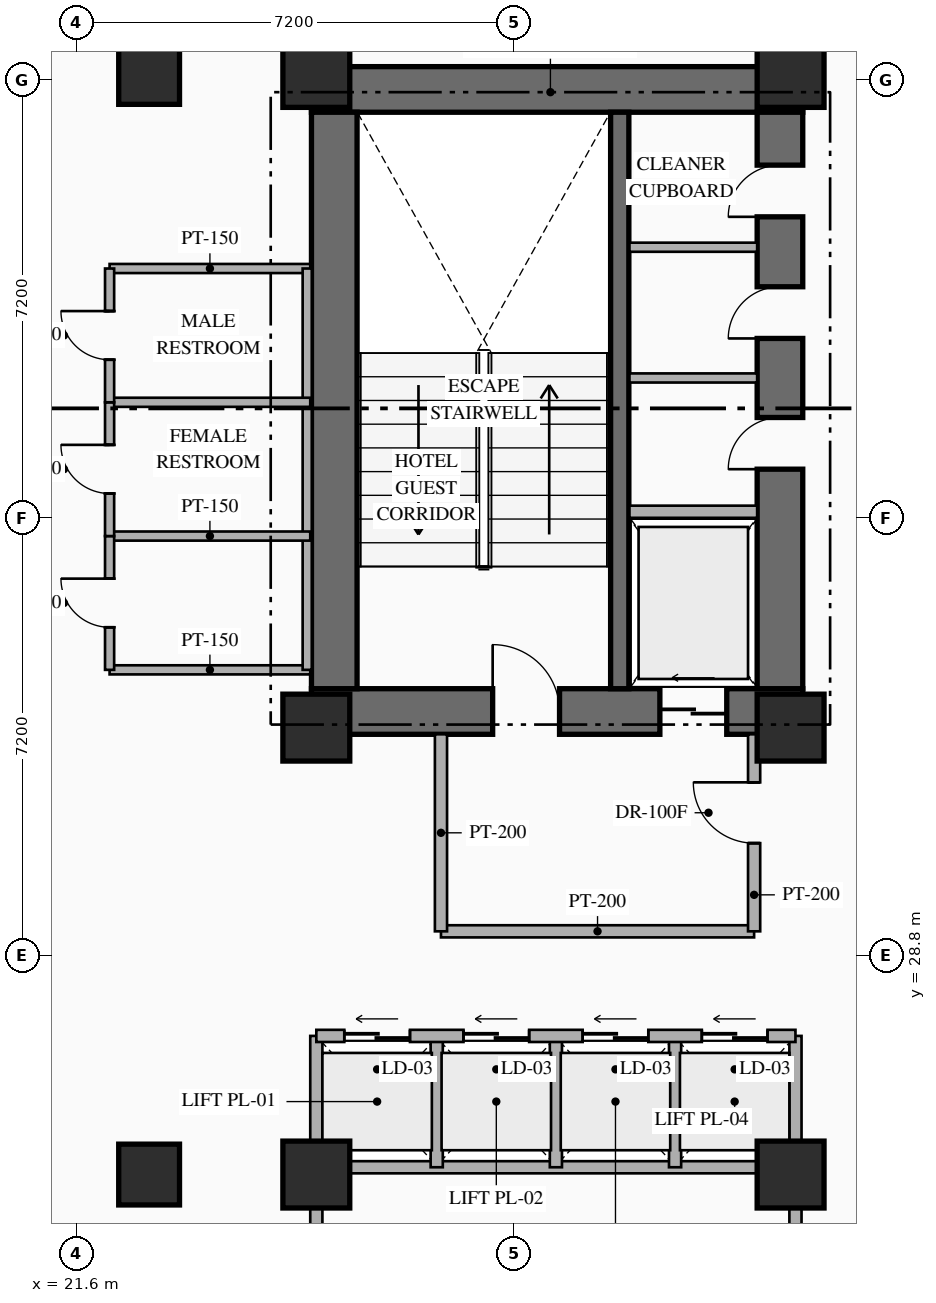
"""IFC4 building model, lengths in metres.
Left out: names, types, materials, properties, quantities, classifications, styles, units other than length and angle.
Written with IfcOpenShell. Run it as: python <this file> out.ifc"""

import sys

from ifc_helpers import new_model, si_unit, direction, frame, frame_2d, origin, origin_2d, place, context, subcontext, project, spatial, rectangle, hollow_rectangle, extrude, element, fill, save


model = new_model("IFC4")
c1 = context("Model", 3, precision=1e-05, world=origin(), true_north=direction((0.0, 1.0)))
c2 = subcontext(c1, "Body", "Model", "MODEL_VIEW")
j1 = project(units=[si_unit("LENGTHUNIT", "METRE"), si_unit("PLANEANGLEUNIT", "RADIAN")], contexts=[c1])
p1 = place(None, origin())
s1 = spatial("IfcSite", under=j1, at=p1, CompositionType="ELEMENT")
p2 = place(p1, origin())
s2 = spatial("IfcBuilding", under=s1, at=p2, CompositionType="ELEMENT")
p3 = place(p2, frame((0.0, 0.0, 60.05)))
s3 = spatial("IfcBuildingStorey", under=s2, at=p3, CompositionType="ELEMENT", Elevation=60.05)
p4 = place(p3, frame((25.47, 32.815, 0.0), z_axis=(0.0, 0.0, 1.0), x_axis=(1.0, 0.0, 0.0)))
e1 = element("IfcWall", 1, at=p4, inside=s3, PredefinedType="SHEAR", context=c2, shape_type="SweptSolid", body=[
    extrude(rectangle(XDim=8.08, YDim=0.75, at=frame_2d((4.04, 0.0))), origin(), (0.0, 0.0, 1.0), 3.35),
])
p5 = place(p4, frame((2.98, 0.0, 0.0)))
e2 = element("IfcOpeningElement", 2, at=p5, cuts=e1, PredefinedType="OPENING", context=c2, shape_type="SweptSolid", body=[
    extrude(rectangle(XDim=1.1, YDim=2.2, at=frame_2d((0.55, 1.1))), frame((0.0, 0.385, 0.0), z_axis=(0.0, -1.0, 0.0), x_axis=(1.0, 0.0, 0.0)), (0.0, 0.0, 1.0), 0.77),
])
p6 = place(p4, frame((5.73, 0.0, 0.0)))
e3 = element("IfcOpeningElement", 3, at=p6, cuts=e1, PredefinedType="OPENING", context=c2, shape_type="SweptSolid", body=[
    extrude(rectangle(XDim=1.1, YDim=2.15, at=frame_2d((0.55, 1.075))), frame((0.0, 0.385, 0.0), z_axis=(0.0, -1.0, 0.0), x_axis=(1.0, 0.0, 0.0)), (0.0, 0.0, 1.0), 0.77),
])
p7 = place(p3, frame((25.47, 43.045, 0.0), z_axis=(0.0, 0.0, 1.0), x_axis=(1.0, 0.0, 0.0)))
e4 = element("IfcWall", 4, at=p7, inside=s3, PredefinedType="SHEAR", context=c2, shape_type="SweptSolid", body=[
    extrude(rectangle(XDim=8.08, YDim=0.75, at=frame_2d((4.04, 0.0))), origin(), (0.0, 0.0, 1.0), 3.35),
])
p8 = place(p3, frame((25.845, 33.19, 0.0), z_axis=(0.0, 0.0, 1.0), x_axis=(0.0, 1.0, 0.0)))
e5 = element("IfcWall", 5, at=p8, inside=s3, PredefinedType="SHEAR", context=c2, shape_type="SweptSolid", body=[
    extrude(rectangle(XDim=9.48, YDim=0.75, at=frame_2d((4.74, 0.0))), origin(), (0.0, 0.0, 1.0), 3.35),
])
p9 = place(p3, frame((33.175, 33.19, 0.0), z_axis=(0.0, 0.0, 1.0), x_axis=(0.0, 1.0, 0.0)))
e6 = element("IfcWall", 6, at=p9, inside=s3, PredefinedType="SHEAR", context=c2, shape_type="SweptSolid", body=[
    extrude(rectangle(XDim=9.48, YDim=0.75, at=frame_2d((4.74, 0.0))), origin(), (0.0, 0.0, 1.0), 3.35),
])
p10 = place(p9, frame((3.61, 0.0, 0.0)))
e7 = element("IfcOpeningElement", 7, at=p10, cuts=e6, PredefinedType="OPENING", context=c2, shape_type="SweptSolid", body=[
    extrude(rectangle(XDim=0.85, YDim=2.08, at=frame_2d((0.425, 1.04))), frame((0.0, 0.385, 0.0), z_axis=(0.0, -1.0, 0.0), x_axis=(1.0, 0.0, 0.0)), (0.0, 0.0, 1.0), 0.77),
])
p11 = place(p9, frame((5.76, 0.0, 0.0)))
e8 = element("IfcOpeningElement", 8, at=p11, cuts=e6, PredefinedType="OPENING", context=c2, shape_type="SweptSolid", body=[
    extrude(rectangle(XDim=0.85, YDim=2.08, at=frame_2d((0.425, 1.04))), frame((0.0, 0.385, 0.0), z_axis=(0.0, -1.0, 0.0), x_axis=(1.0, 0.0, 0.0)), (0.0, 0.0, 1.0), 0.77),
])
p12 = place(p9, frame((7.76, 0.0, 0.0)))
e9 = element("IfcOpeningElement", 9, at=p12, cuts=e6, PredefinedType="OPENING", context=c2, shape_type="SweptSolid", body=[
    extrude(rectangle(XDim=0.85, YDim=2.08, at=frame_2d((0.425, 1.04))), frame((0.0, 0.385, 0.0), z_axis=(0.0, -1.0, 0.0), x_axis=(1.0, 0.0, 0.0)), (0.0, 0.0, 1.0), 0.77),
])
p13 = place(p3, frame((30.54, 33.19, 0.0), z_axis=(0.0, 0.0, 1.0), x_axis=(0.0, 1.0, 0.0)))
e10 = element("IfcWall", 10, at=p13, inside=s3, PredefinedType="SHEAR", context=c2, shape_type="SweptSolid", body=[
    extrude(rectangle(XDim=9.48, YDim=0.3, at=frame_2d((4.74, 0.0))), origin(), (0.0, 0.0, 1.0), 3.35),
])
for number, where, z_axis, x_axis in (
    (11, (25.55, 32.55, 0.0), (0.0, 0.0, 1.0), (1.0, 0.0, 0.0)),
    (12, (33.35, 32.55, 0.0), (0.0, 0.0, 1.0), (1.0, 0.0, 0.0)),
    (13, (25.55, 43.3, 0.0), (0.0, 0.0, 1.0), (1.0, 0.0, 0.0)),
    (14, (33.35, 43.3, 0.0), (0.0, 0.0, 1.0), (1.0, 0.0, 0.0)),
):
    element("IfcColumn", number, at=place(p3, frame(where, z_axis=z_axis, x_axis=x_axis)), inside=s3, PredefinedType="COLUMN", context=c2, shape_type="SweptSolid", body=[
        extrude(rectangle(XDim=1.1, YDim=1.1, at=origin_2d()), origin(), (0.0, 0.0, 1.0), 3.35),
    ])
for number, where, z_axis, x_axis in (
    (15, (25.55, 25.2, 0.0), (0.0, 0.0, 1.0), (1.0, 0.0, 0.0)),
    (16, (33.35, 25.2, 0.0), (0.0, 0.0, 1.0), (1.0, 0.0, 0.0)),
):
    element("IfcColumn", number, at=place(p3, frame(where, z_axis=z_axis, x_axis=x_axis)), inside=s3, PredefinedType="COLUMN", context=c2, shape_type="SweptSolid", body=[
        extrude(hollow_rectangle(XDim=1.1, YDim=1.1, WallThickness=0.04, at=origin_2d()), origin(), (0.0, 0.0, 1.0), 3.35),
    ])
for number, where, z_axis, x_axis in (
    (17, (22.8, 25.2, 0.0), (0.0, 0.0, 1.0), (1.0, 0.0, 0.0)),
    (18, (22.8, 43.3, 0.0), (0.0, 0.0, 1.0), (1.0, 0.0, 0.0)),
):
    element("IfcColumn", number, at=place(p3, frame(where, z_axis=z_axis, x_axis=x_axis)), inside=s3, PredefinedType="COLUMN", context=c2, shape_type="SweptSolid", body=[
        extrude(hollow_rectangle(XDim=1.0, YDim=1.0, WallThickness=0.038, at=origin_2d()), origin(), (0.0, 0.0, 1.0), 3.35),
    ])
p14 = place(p3, frame((30.7, 36.1, 0.0), z_axis=(0.0, 0.0, 1.0), x_axis=(1.0, 0.0, 0.0)))
e19 = element("IfcWall", 19, at=p14, inside=s3, PredefinedType="STANDARD", context=c2, shape_type="SweptSolid", body=[
    extrude(rectangle(XDim=2.1, YDim=0.2, at=frame_2d((1.05, 0.0))), origin(), (0.0, 0.0, 1.0), 3.13),
])
for number, where, z_axis, x_axis in (
    (20, (30.7, 38.3, 0.0), (0.0, 0.0, 1.0), (1.0, 0.0, 0.0)),
    (21, (30.7, 40.45, 0.0), (0.0, 0.0, 1.0), (1.0, 0.0, 0.0)),
):
    element("IfcWall", number, at=place(p3, frame(where, z_axis=z_axis, x_axis=x_axis)), inside=s3, PredefinedType="PARTITIONING", context=c2, shape_type="SweptSolid", body=[
        extrude(rectangle(XDim=2.1, YDim=0.15, at=frame_2d((1.05, 0.0))), origin(), (0.0, 0.0, 1.0), 3.13),
    ])
p15 = place(p3, frame((27.6, 29.2, 0.0), z_axis=(0.0, 0.0, 1.0), x_axis=(1.0, 0.0, 0.0)))
e22 = element("IfcWall", 22, at=p15, inside=s3, PredefinedType="STANDARD", context=c2, shape_type="SweptSolid", body=[
    extrude(rectangle(XDim=5.15, YDim=0.2, at=frame_2d((2.575, 0.0))), origin(), (0.0, 0.0, 1.0), 3.13),
])
p16 = place(p3, frame((27.6, 29.2, 0.0), z_axis=(0.0, 0.0, 1.0), x_axis=(0.0, 1.0, 0.0)))
e23 = element("IfcWall", 23, at=p16, inside=s3, PredefinedType="STANDARD", context=c2, shape_type="SweptSolid", body=[
    extrude(rectangle(XDim=3.24, YDim=0.2, at=frame_2d((1.62, 0.0))), origin(), (0.0, 0.0, 1.0), 3.13),
])
p17 = place(p3, frame((32.75, 29.2, 0.0), z_axis=(0.0, 0.0, 1.0), x_axis=(0.0, 1.0, 0.0)))
e24 = element("IfcWall", 24, at=p17, inside=s3, PredefinedType="STANDARD", context=c2, shape_type="SweptSolid", body=[
    extrude(rectangle(XDim=3.24, YDim=0.2, at=frame_2d((1.62, 0.0))), origin(), (0.0, 0.0, 1.0), 3.13),
])
p18 = place(p17, frame((1.45, 0.0, 0.0)))
e25 = element("IfcOpeningElement", 25, at=p18, cuts=e24, PredefinedType="OPENING", context=c2, shape_type="SweptSolid", body=[
    extrude(rectangle(XDim=1.0, YDim=2.2, at=frame_2d((0.5, 1.1))), frame((0.0, 0.11, 0.0), z_axis=(0.0, -1.0, 0.0), x_axis=(1.0, 0.0, 0.0)), (0.0, 0.0, 1.0), 0.22),
])
for number, where, z_axis, x_axis in (
    (26, (25.55, 23.4, 0.0), (0.0, 0.0, 1.0), (0.0, 1.0, 0.0)),
    (27, (33.43, 23.4, 0.0), (0.0, 0.0, 1.0), (0.0, 1.0, 0.0)),
):
    element("IfcWall", number, at=place(p3, frame(where, z_axis=z_axis, x_axis=x_axis)), inside=s3, PredefinedType="STANDARD", context=c2, shape_type="SweptSolid", body=[
        extrude(rectangle(XDim=4.08, YDim=0.2, at=frame_2d((2.04, 0.0))), origin(), (0.0, 0.0, 1.0), 2.425),
    ])
p19 = place(p3, frame((25.55, 25.32, 0.0), z_axis=(0.0, 0.0, 1.0), x_axis=(1.0, 0.0, 0.0)))
e28 = element("IfcWall", 28, at=p19, inside=s3, PredefinedType="STANDARD", context=c2, shape_type="SweptSolid", body=[
    extrude(rectangle(XDim=7.88, YDim=0.2, at=frame_2d((3.94, 0.0))), origin(), (0.0, 0.0, 1.0), 2.525),
])
for number, where, z_axis, x_axis in (
    (29, (27.53, 25.32, 0.0), (0.0, 0.0, 1.0), (0.0, 1.0, 0.0)),
    (30, (29.49, 25.32, 0.0), (0.0, 0.0, 1.0), (0.0, 1.0, 0.0)),
    (31, (31.45, 25.32, 0.0), (0.0, 0.0, 1.0), (0.0, 1.0, 0.0)),
):
    element("IfcWall", number, at=place(p3, frame(where, z_axis=z_axis, x_axis=x_axis)), inside=s3, PredefinedType="STANDARD", context=c2, shape_type="SweptSolid", body=[
        extrude(rectangle(XDim=2.16, YDim=0.2, at=frame_2d((1.08, 0.0))), origin(), (0.0, 0.0, 1.0), 3.13),
    ])
p20 = place(p3, frame((25.55, 27.48, 0.0), z_axis=(0.0, 0.0, 1.0), x_axis=(1.0, 0.0, 0.0)))
e32 = element("IfcWall", 32, at=p20, inside=s3, PredefinedType="STANDARD", context=c2, shape_type="SweptSolid", body=[
    extrude(rectangle(XDim=7.88, YDim=0.2, at=frame_2d((3.94, 0.0))), origin(), (0.0, 0.0, 1.0), 3.13),
])
p21 = place(p20, frame((0.46, 0.0, 0.0)))
e33 = element("IfcOpeningElement", 33, at=p21, cuts=e32, PredefinedType="OPENING", context=c2, shape_type="SweptSolid", body=[
    extrude(rectangle(XDim=1.08, YDim=2.15, at=frame_2d((0.54, 1.075))), frame((0.0, 0.11, 0.0), z_axis=(0.0, -1.0, 0.0), x_axis=(1.0, 0.0, 0.0)), (0.0, 0.0, 1.0), 0.22),
])
p22 = place(p20, frame((2.42, 0.0, 0.0)))
e34 = element("IfcOpeningElement", 34, at=p22, cuts=e32, PredefinedType="OPENING", context=c2, shape_type="SweptSolid", body=[
    extrude(rectangle(XDim=1.08, YDim=2.15, at=frame_2d((0.54, 1.075))), frame((0.0, 0.11, 0.0), z_axis=(0.0, -1.0, 0.0), x_axis=(1.0, 0.0, 0.0)), (0.0, 0.0, 1.0), 0.22),
])
p23 = place(p20, frame((4.38, 0.0, 0.0)))
e35 = element("IfcOpeningElement", 35, at=p23, cuts=e32, PredefinedType="OPENING", context=c2, shape_type="SweptSolid", body=[
    extrude(rectangle(XDim=1.08, YDim=2.15, at=frame_2d((0.54, 1.075))), frame((0.0, 0.11, 0.0), z_axis=(0.0, -1.0, 0.0), x_axis=(1.0, 0.0, 0.0)), (0.0, 0.0, 1.0), 0.22),
])
p24 = place(p20, frame((6.34, 0.0, 0.0)))
e36 = element("IfcOpeningElement", 36, at=p24, cuts=e32, PredefinedType="OPENING", context=c2, shape_type="SweptSolid", body=[
    extrude(rectangle(XDim=1.08, YDim=2.15, at=frame_2d((0.54, 1.075))), frame((0.0, 0.11, 0.0), z_axis=(0.0, -1.0, 0.0), x_axis=(1.0, 0.0, 0.0)), (0.0, 0.0, 1.0), 0.22),
])
for number, where, z_axis, x_axis in (
    (37, (22.15, 33.5, 0.0), (0.0, 0.0, 1.0), (1.0, 0.0, 0.0)),
    (38, (22.15, 40.1, 0.0), (0.0, 0.0, 1.0), (1.0, 0.0, 0.0)),
):
    element("IfcWall", number, at=place(p3, frame(where, z_axis=z_axis, x_axis=x_axis)), inside=s3, PredefinedType="PARTITIONING", context=c2, shape_type="SweptSolid", body=[
        extrude(rectangle(XDim=3.3, YDim=0.15, at=frame_2d((1.65, 0.0))), origin(), (0.0, 0.0, 1.0), 3.13),
    ])
p25 = place(p3, frame((25.4, 33.5, 0.0), z_axis=(0.0, 0.0, 1.0), x_axis=(0.0, 1.0, 0.0)))
e39 = element("IfcWall", 39, at=p25, inside=s3, PredefinedType="PARTITIONING", context=c2, shape_type="SweptSolid", body=[
    extrude(rectangle(XDim=6.6, YDim=0.15, at=frame_2d((3.3, 0.0))), origin(), (0.0, 0.0, 1.0), 3.13),
])
for number, where, z_axis, x_axis in (
    (40, (22.15, 35.7, 0.0), (0.0, 0.0, 1.0), (1.0, 0.0, 0.0)),
    (41, (22.15, 37.9, 0.0), (0.0, 0.0, 1.0), (1.0, 0.0, 0.0)),
):
    element("IfcWall", number, at=place(p3, frame(where, z_axis=z_axis, x_axis=x_axis)), inside=s3, PredefinedType="PARTITIONING", context=c2, shape_type="SweptSolid", body=[
        extrude(rectangle(XDim=3.3, YDim=0.15, at=frame_2d((1.65, 0.0))), origin(), (0.0, 0.0, 1.0), 3.13),
    ])
p26 = place(p3, frame((22.15, 33.5, 0.0), z_axis=(0.0, 0.0, 1.0), x_axis=(0.0, 1.0, 0.0)))
e42 = element("IfcWall", 42, at=p26, inside=s3, PredefinedType="PARTITIONING", context=c2, shape_type="SweptSolid", body=[
    extrude(rectangle(XDim=2.2, YDim=0.15, at=frame_2d((1.1, 0.0))), origin(), (0.0, 0.0, 1.0), 3.13),
])
p27 = place(p26, frame((0.7, 0.0, 0.0)))
e43 = element("IfcOpeningElement", 43, at=p27, cuts=e42, PredefinedType="OPENING", context=c2, shape_type="SweptSolid", body=[
    extrude(rectangle(XDim=0.8, YDim=2.06, at=frame_2d((0.4, 1.03))), frame((0.0, 0.085, 0.0), z_axis=(0.0, -1.0, 0.0), x_axis=(1.0, 0.0, 0.0)), (0.0, 0.0, 1.0), 0.17),
])
p28 = place(p3, frame((22.15, 35.7, 0.0), z_axis=(0.0, 0.0, 1.0), x_axis=(0.0, 1.0, 0.0)))
e44 = element("IfcWall", 44, at=p28, inside=s3, PredefinedType="PARTITIONING", context=c2, shape_type="SweptSolid", body=[
    extrude(rectangle(XDim=2.2, YDim=0.15, at=frame_2d((1.1, 0.0))), origin(), (0.0, 0.0, 1.0), 3.13),
])
p29 = place(p28, frame((0.7, 0.0, 0.0)))
e45 = element("IfcOpeningElement", 45, at=p29, cuts=e44, PredefinedType="OPENING", context=c2, shape_type="SweptSolid", body=[
    extrude(rectangle(XDim=0.8, YDim=2.06, at=frame_2d((0.4, 1.03))), frame((0.0, 0.085, 0.0), z_axis=(0.0, -1.0, 0.0), x_axis=(1.0, 0.0, 0.0)), (0.0, 0.0, 1.0), 0.17),
])
p30 = place(p3, frame((22.15, 37.9, 0.0), z_axis=(0.0, 0.0, 1.0), x_axis=(0.0, 1.0, 0.0)))
e46 = element("IfcWall", 46, at=p30, inside=s3, PredefinedType="PARTITIONING", context=c2, shape_type="SweptSolid", body=[
    extrude(rectangle(XDim=2.2, YDim=0.15, at=frame_2d((1.1, 0.0))), origin(), (0.0, 0.0, 1.0), 3.13),
])
p31 = place(p30, frame((0.7, 0.0, 0.0)))
e47 = element("IfcOpeningElement", 47, at=p31, cuts=e46, PredefinedType="OPENING", context=c2, shape_type="SweptSolid", body=[
    extrude(rectangle(XDim=0.8, YDim=2.06, at=frame_2d((0.4, 1.03))), frame((0.0, 0.085, 0.0), z_axis=(0.0, -1.0, 0.0), x_axis=(1.0, 0.0, 0.0)), (0.0, 0.0, 1.0), 0.17),
])
p32 = place(p3, frame((33.384, 17.312, 0.0), z_axis=(0.0, 0.0, 1.0), x_axis=(0.600008743659, 0.799993442181, 0.0)))
e48 = element("IfcWall", 48, at=p32, inside=s3, PredefinedType="PARTITIONING", context=c2, shape_type="SweptSolid", body=[
    extrude(rectangle(XDim=8.935, YDim=0.15, at=frame_2d((4.468, 0.0))), origin(), (0.0, 0.0, 1.0), 3.13),
])
p33 = place(p5, origin())
e49 = element("IfcDoor", 49, at=p33, inside=s3, OperationType="SINGLE_SWING_LEFT", PredefinedType="DOOR", context=c2, shape_type="SweptSolid", body=[
    extrude(rectangle(XDim=1.1, YDim=2.2, at=frame_2d((0.55, 1.1))), frame((0.0, 0.025, 0.0), z_axis=(0.0, -1.0, 0.0), x_axis=(1.0, 0.0, 0.0)), (0.0, 0.0, 1.0), 0.05),
])
fill(e2, e49)
p34 = place(p6, origin())
e50 = element("IfcDoor", 50, at=p34, inside=s3, OperationType="SLIDING_TO_LEFT", PredefinedType="USERDEFINED", context=c2, shape_type="SweptSolid", body=[
    extrude(rectangle(XDim=1.1, YDim=2.15, at=frame_2d((0.55, 1.075))), frame((0.0, 0.025, 0.0), z_axis=(0.0, -1.0, 0.0), x_axis=(1.0, 0.0, 0.0)), (0.0, 0.0, 1.0), 0.05),
])
fill(e3, e50)
p35 = place(p10, origin())
e51 = element("IfcDoor", 51, at=p35, inside=s3, OperationType="SINGLE_SWING_LEFT", PredefinedType="DOOR", context=c2, shape_type="SweptSolid", body=[
    extrude(rectangle(XDim=0.85, YDim=2.08, at=frame_2d((0.425, 1.04))), frame((0.0, 0.025, 0.0), z_axis=(0.0, -1.0, 0.0), x_axis=(1.0, 0.0, 0.0)), (0.0, 0.0, 1.0), 0.05),
])
fill(e7, e51)
p36 = place(p11, origin())
e52 = element("IfcDoor", 52, at=p36, inside=s3, OperationType="SINGLE_SWING_LEFT", PredefinedType="DOOR", context=c2, shape_type="SweptSolid", body=[
    extrude(rectangle(XDim=0.85, YDim=2.08, at=frame_2d((0.425, 1.04))), frame((0.0, 0.025, 0.0), z_axis=(0.0, -1.0, 0.0), x_axis=(1.0, 0.0, 0.0)), (0.0, 0.0, 1.0), 0.05),
])
fill(e8, e52)
p37 = place(p12, origin())
e53 = element("IfcDoor", 53, at=p37, inside=s3, OperationType="SINGLE_SWING_LEFT", PredefinedType="DOOR", context=c2, shape_type="SweptSolid", body=[
    extrude(rectangle(XDim=0.85, YDim=2.08, at=frame_2d((0.425, 1.04))), frame((0.0, 0.025, 0.0), z_axis=(0.0, -1.0, 0.0), x_axis=(1.0, 0.0, 0.0)), (0.0, 0.0, 1.0), 0.05),
])
fill(e9, e53)
p38 = place(p18, origin())
e54 = element("IfcDoor", 54, at=p38, inside=s3, OperationType="SINGLE_SWING_RIGHT", PredefinedType="DOOR", context=c2, shape_type="SweptSolid", body=[
    extrude(rectangle(XDim=1.0, YDim=2.2, at=frame_2d((0.5, 1.1))), frame((0.0, 0.025, 0.0), z_axis=(0.0, -1.0, 0.0), x_axis=(1.0, 0.0, 0.0)), (0.0, 0.0, 1.0), 0.05),
])
fill(e25, e54)
p39 = place(p21, origin())
e55 = element("IfcDoor", 55, at=p39, inside=s3, OperationType="SLIDING_TO_LEFT", PredefinedType="USERDEFINED", context=c2, shape_type="SweptSolid", body=[
    extrude(rectangle(XDim=1.08, YDim=2.15, at=frame_2d((0.54, 1.075))), frame((0.0, 0.025, 0.0), z_axis=(0.0, -1.0, 0.0), x_axis=(1.0, 0.0, 0.0)), (0.0, 0.0, 1.0), 0.05),
])
fill(e33, e55)
p40 = place(p22, origin())
e56 = element("IfcDoor", 56, at=p40, inside=s3, OperationType="SLIDING_TO_LEFT", PredefinedType="USERDEFINED", context=c2, shape_type="SweptSolid", body=[
    extrude(rectangle(XDim=1.08, YDim=2.15, at=frame_2d((0.54, 1.075))), frame((0.0, 0.025, 0.0), z_axis=(0.0, -1.0, 0.0), x_axis=(1.0, 0.0, 0.0)), (0.0, 0.0, 1.0), 0.05),
])
fill(e34, e56)
p41 = place(p23, origin())
e57 = element("IfcDoor", 57, at=p41, inside=s3, OperationType="SLIDING_TO_LEFT", PredefinedType="USERDEFINED", context=c2, shape_type="SweptSolid", body=[
    extrude(rectangle(XDim=1.08, YDim=2.15, at=frame_2d((0.54, 1.075))), frame((0.0, 0.025, 0.0), z_axis=(0.0, -1.0, 0.0), x_axis=(1.0, 0.0, 0.0)), (0.0, 0.0, 1.0), 0.05),
])
fill(e35, e57)
p42 = place(p24, origin())
e58 = element("IfcDoor", 58, at=p42, inside=s3, OperationType="SLIDING_TO_LEFT", PredefinedType="USERDEFINED", context=c2, shape_type="SweptSolid", body=[
    extrude(rectangle(XDim=1.08, YDim=2.15, at=frame_2d((0.54, 1.075))), frame((0.0, 0.025, 0.0), z_axis=(0.0, -1.0, 0.0), x_axis=(1.0, 0.0, 0.0)), (0.0, 0.0, 1.0), 0.05),
])
fill(e36, e58)
p43 = place(p27, origin())
e59 = element("IfcDoor", 59, at=p43, inside=s3, OperationType="SINGLE_SWING_RIGHT", PredefinedType="DOOR", context=c2, shape_type="SweptSolid", body=[
    extrude(rectangle(XDim=0.8, YDim=2.06, at=frame_2d((0.4, 1.03))), frame((0.0, 0.025, 0.0), z_axis=(0.0, -1.0, 0.0), x_axis=(1.0, 0.0, 0.0)), (0.0, 0.0, 1.0), 0.05),
])
fill(e43, e59)
p44 = place(p29, origin())
e60 = element("IfcDoor", 60, at=p44, inside=s3, OperationType="SINGLE_SWING_RIGHT", PredefinedType="DOOR", context=c2, shape_type="SweptSolid", body=[
    extrude(rectangle(XDim=0.8, YDim=2.06, at=frame_2d((0.4, 1.03))), frame((0.0, 0.025, 0.0), z_axis=(0.0, -1.0, 0.0), x_axis=(1.0, 0.0, 0.0)), (0.0, 0.0, 1.0), 0.05),
])
fill(e45, e60)
p45 = place(p31, origin())
e61 = element("IfcDoor", 61, at=p45, inside=s3, OperationType="SINGLE_SWING_RIGHT", PredefinedType="DOOR", context=c2, shape_type="SweptSolid", body=[
    extrude(rectangle(XDim=0.8, YDim=2.06, at=frame_2d((0.4, 1.03))), frame((0.0, 0.025, 0.0), z_axis=(0.0, -1.0, 0.0), x_axis=(1.0, 0.0, 0.0)), (0.0, 0.0, 1.0), 0.05),
])
fill(e47, e61)
save(model, sys.argv[1])
